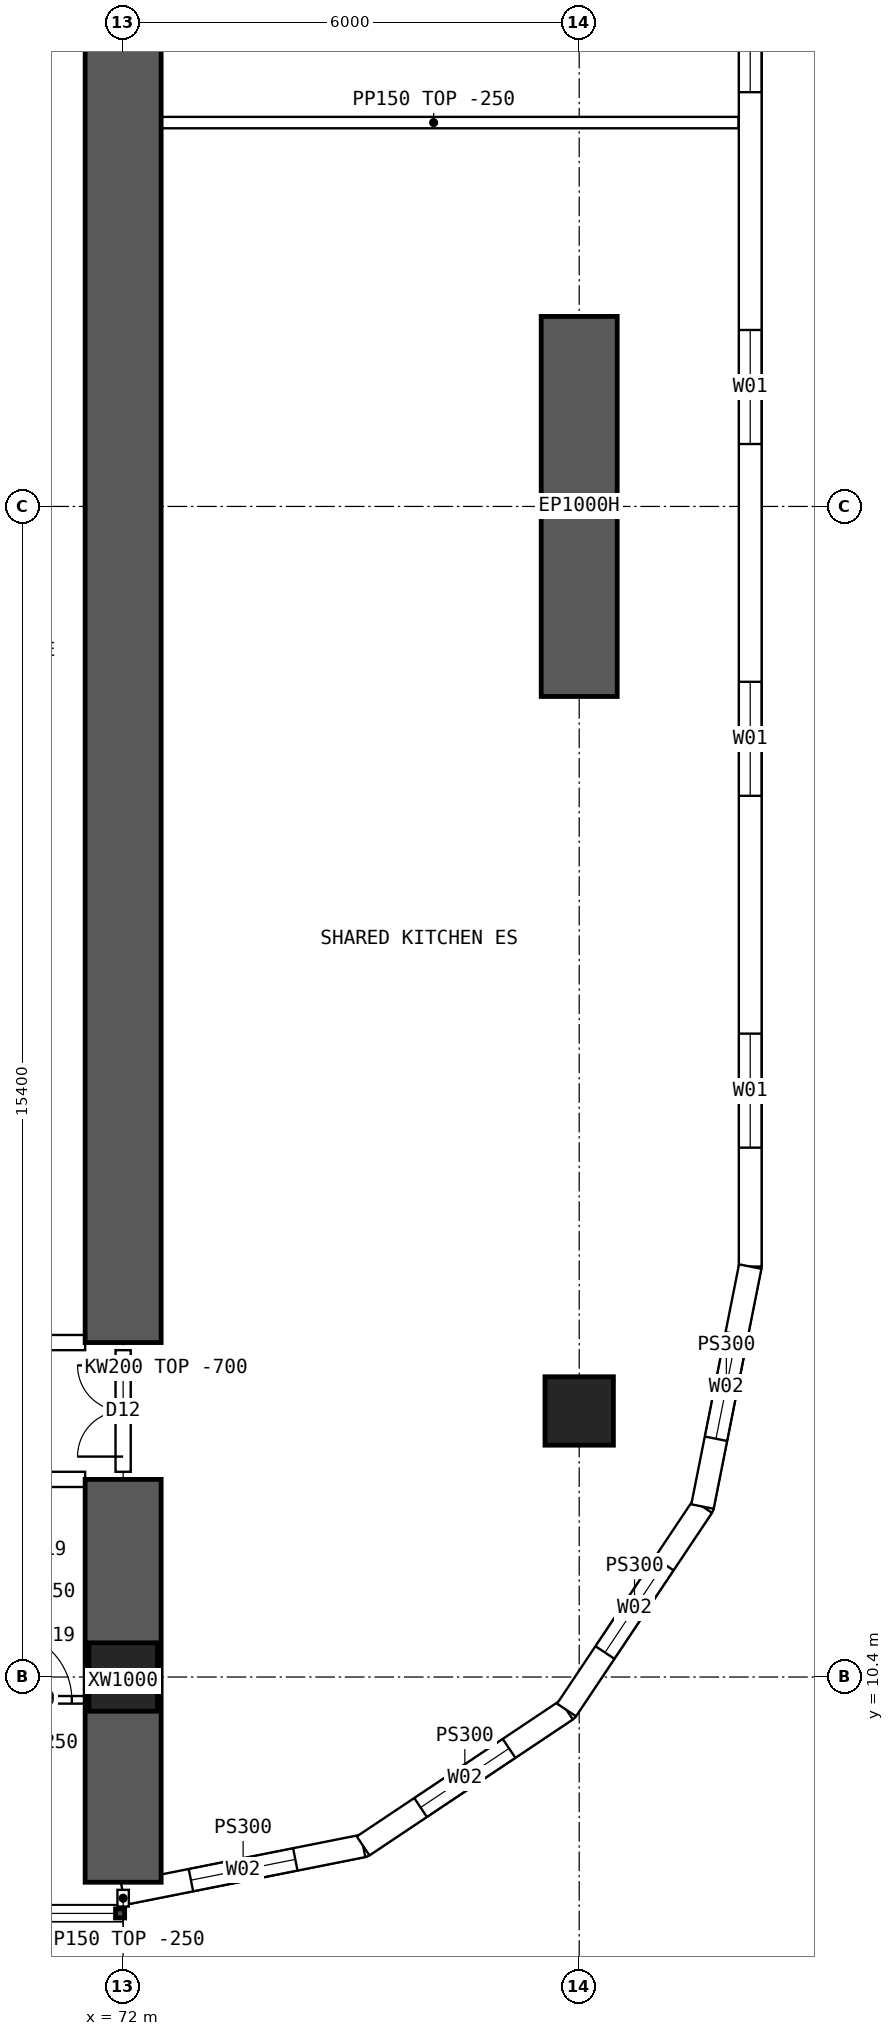
"""IFC4 building model, lengths in metres.
Left out: names, types, materials, properties, quantities, classifications, styles, units other than length and angle.
Written with IfcOpenShell. Run it as: python <this file> out.ifc"""

import sys

from ifc_helpers import new_model, si_unit, direction, frame, frame_2d, origin, origin_2d, place, context, subcontext, project, spatial, polyline, rectangle, hollow_rectangle, outline, extrude, element, fill, save


model = new_model("IFC4")
c1 = context("Model", 3, precision=1e-05, world=origin(), true_north=direction((0.0, 1.0)))
c2 = subcontext(c1, "Body", "Model", "MODEL_VIEW")
j1 = project(units=[si_unit("LENGTHUNIT", "METRE"), si_unit("PLANEANGLEUNIT", "RADIAN")], contexts=[c1])
p1 = place(None, origin())
s1 = spatial("IfcSite", under=j1, at=p1, CompositionType="ELEMENT")
p2 = place(p1, origin())
s2 = spatial("IfcBuilding", under=s1, at=p2, CompositionType="ELEMENT")
p3 = place(p2, frame((0.0, 0.0, 42.7)))
s3 = spatial("IfcBuildingStorey", under=s2, at=p3, CompositionType="ELEMENT", Elevation=42.7)
for number, where, z_axis, x_axis in (
    (1, (72.0, 10.4, 0.0), (0.0, 0.0, 1.0), (1.0, 0.0, 0.0)),
    (2, (78.0, 13.9, 0.0), (0.0, 0.0, 1.0), (1.0, 0.0, 0.0)),
):
    element("IfcColumn", number, at=place(p3, frame(where, z_axis=z_axis, x_axis=x_axis)), inside=s3, PredefinedType="COLUMN", context=c2, shape_type="SweptSolid", body=[
        extrude(hollow_rectangle(XDim=0.9, YDim=0.9, WallThickness=0.09, at=origin_2d()), origin(), (0.0, 0.0, 1.0), 3.75),
    ])
p4 = place(p3, frame((78.0, 23.3, 0.0), z_axis=(0.0, 0.0, 1.0), x_axis=(0.0, 1.0, 0.0)))
e3 = element("IfcWall", 3, at=p4, inside=s3, PredefinedType="SHEAR", context=c2, shape_type="SweptSolid", body=[
    extrude(rectangle(XDim=5.0, YDim=1.0, at=frame_2d((2.5, 0.0))), origin(), (0.0, 0.0, 1.0), 3.75),
])
p5 = place(p3, frame((72.0, 7.7, 0.0), z_axis=(0.0, 0.0, 1.0), x_axis=(0.0, 1.0, 0.0)))
e4 = element("IfcWall", 4, at=p5, inside=s3, PredefinedType="SHEAR", context=c2, shape_type="SweptSolid", body=[
    extrude(rectangle(XDim=5.3, YDim=1.0, at=frame_2d((2.65, 0.0))), origin(), (0.0, 0.0, 1.0), 3.75),
])
p6 = place(p3, frame((72.0, 14.8, 0.0), z_axis=(0.0, 0.0, 1.0), x_axis=(0.0, 1.0, 0.0)))
e5 = element("IfcWall", 5, at=p6, inside=s3, PredefinedType="SHEAR", context=c2, shape_type="SweptSolid", body=[
    extrude(rectangle(XDim=34.4, YDim=1.0, at=frame_2d((17.2, 0.0))), origin(), (0.0, 0.0, 1.0), 3.75),
])
p7 = place(p3, frame((80.25, 15.8, 0.0), z_axis=(0.0, 0.0, 1.0), x_axis=(0.0, 1.0, 0.0)))
e6 = element("IfcWall", 6, at=p7, inside=s3, PredefinedType="SOLIDWALL", context=c2, shape_type="SweptSolid", body=[
    extrude(outline(polyline([(-0.015, -0.15), (32.415, -0.15), (32.385, 0.15), (0.015, 0.15), (-0.015, -0.15)])), origin(), (0.0, 0.0, 1.0), 3.5),
])
p8 = place(p7, frame((1.564, 0.0, 0.9)))
e7 = element("IfcOpeningElement", 7, at=p8, cuts=e6, PredefinedType="OPENING", context=c2, shape_type="SweptSolid", body=[
    extrude(rectangle(XDim=1.5, YDim=2.0, at=frame_2d((0.75, 1.0))), frame((0.0, 0.16, 0.0), z_axis=(0.0, -1.0, 0.0), x_axis=(1.0, 0.0, 0.0)), (0.0, 0.0, 1.0), 0.32),
])
p9 = place(p7, frame((6.193, 0.0, 0.9)))
e8 = element("IfcOpeningElement", 8, at=p9, cuts=e6, PredefinedType="OPENING", context=c2, shape_type="SweptSolid", body=[
    extrude(rectangle(XDim=1.5, YDim=2.0, at=frame_2d((0.75, 1.0))), frame((0.0, 0.16, 0.0), z_axis=(0.0, -1.0, 0.0), x_axis=(1.0, 0.0, 0.0)), (0.0, 0.0, 1.0), 0.32),
])
p10 = place(p7, frame((10.822, 0.0, 0.9)))
e9 = element("IfcOpeningElement", 9, at=p10, cuts=e6, PredefinedType="OPENING", context=c2, shape_type="SweptSolid", body=[
    extrude(rectangle(XDim=1.5, YDim=2.0, at=frame_2d((0.75, 1.0))), frame((0.0, 0.16, 0.0), z_axis=(0.0, -1.0, 0.0), x_axis=(1.0, 0.0, 0.0)), (0.0, 0.0, 1.0), 0.32),
])
p11 = place(p7, frame((15.45, 0.0, 0.9)))
e10 = element("IfcOpeningElement", 10, at=p11, cuts=e6, PredefinedType="OPENING", context=c2, shape_type="SweptSolid", body=[
    extrude(rectangle(XDim=1.5, YDim=2.0, at=frame_2d((0.75, 1.0))), frame((0.0, 0.16, 0.0), z_axis=(0.0, -1.0, 0.0), x_axis=(1.0, 0.0, 0.0)), (0.0, 0.0, 1.0), 0.32),
])
p12 = place(p7, frame((20.079, 0.0, 0.9)))
e11 = element("IfcOpeningElement", 11, at=p12, cuts=e6, PredefinedType="OPENING", context=c2, shape_type="SweptSolid", body=[
    extrude(rectangle(XDim=1.5, YDim=2.0, at=frame_2d((0.75, 1.0))), frame((0.0, 0.16, 0.0), z_axis=(0.0, -1.0, 0.0), x_axis=(1.0, 0.0, 0.0)), (0.0, 0.0, 1.0), 0.32),
])
p13 = place(p7, frame((24.707, 0.0, 0.9)))
e12 = element("IfcOpeningElement", 12, at=p13, cuts=e6, PredefinedType="OPENING", context=c2, shape_type="SweptSolid", body=[
    extrude(rectangle(XDim=1.5, YDim=2.0, at=frame_2d((0.75, 1.0))), frame((0.0, 0.16, 0.0), z_axis=(0.0, -1.0, 0.0), x_axis=(1.0, 0.0, 0.0)), (0.0, 0.0, 1.0), 0.32),
])
p14 = place(p7, frame((29.336, 0.0, 0.9)))
e13 = element("IfcOpeningElement", 13, at=p14, cuts=e6, PredefinedType="OPENING", context=c2, shape_type="SweptSolid", body=[
    extrude(rectangle(XDim=1.5, YDim=2.0, at=frame_2d((0.75, 1.0))), frame((0.0, 0.16, 0.0), z_axis=(0.0, -1.0, 0.0), x_axis=(1.0, 0.0, 0.0)), (0.0, 0.0, 1.0), 0.32),
])
p15 = place(p3, frame((72.0, 7.55, 0.0), z_axis=(0.0, 0.0, 1.0), x_axis=(0.980787251524, 0.195080412259, 0.0)))
e14 = element("IfcWall", 14, at=p15, inside=s3, PredefinedType="SOLIDWALL", context=c2, shape_type="SweptSolid", body=[
    extrude(outline(polyline([(-0.03, -0.15), (3.249, -0.15), (3.189, 0.15), (0.03, 0.15), (-0.03, -0.15)])), origin(), (0.0, 0.0, 1.0), 3.5),
])
p16 = place(p15, frame((0.909, 0.0, 0.9)))
e15 = element("IfcOpeningElement", 15, at=p16, cuts=e14, PredefinedType="OPENING", context=c2, shape_type="SweptSolid", body=[
    extrude(rectangle(XDim=1.4, YDim=1.8, at=frame_2d((0.7, 0.9))), frame((0.0, 0.16, 0.0), z_axis=(0.0, -1.0, 0.0), x_axis=(1.0, 0.0, 0.0)), (0.0, 0.0, 1.0), 0.32),
])
p17 = place(p3, frame((75.157, 8.178, 0.0), z_axis=(0.0, 0.0, 1.0), x_axis=(0.831478105043, 0.555557522525, 0.0)))
e16 = element("IfcWall", 16, at=p17, inside=s3, PredefinedType="SOLIDWALL", context=c2, shape_type="SweptSolid", body=[
    extrude(outline(polyline([(-0.03, -0.15), (3.249, -0.15), (3.189, 0.15), (0.03, 0.15), (-0.03, -0.15)])), origin(), (0.0, 0.0, 1.0), 3.5),
])
p18 = place(p17, frame((0.909, 0.0, 0.9)))
e17 = element("IfcOpeningElement", 17, at=p18, cuts=e16, PredefinedType="OPENING", context=c2, shape_type="SweptSolid", body=[
    extrude(rectangle(XDim=1.4, YDim=1.8, at=frame_2d((0.7, 0.9))), frame((0.0, 0.16, 0.0), z_axis=(0.0, -1.0, 0.0), x_axis=(1.0, 0.0, 0.0)), (0.0, 0.0, 1.0), 0.32),
])
p19 = place(p3, frame((77.833, 9.966, 0.0), z_axis=(0.0, 0.0, 1.0), x_axis=(0.555609954424, 0.831443069936, 0.0)))
e18 = element("IfcWall", 18, at=p19, inside=s3, PredefinedType="SOLIDWALL", context=c2, shape_type="SweptSolid", body=[
    extrude(outline(polyline([(-0.03, -0.15), (3.249, -0.15), (3.189, 0.15), (0.03, 0.15), (-0.03, -0.15)])), origin(), (0.0, 0.0, 1.0), 3.5),
])
p20 = place(p19, frame((0.909, 0.0, 0.9)))
e19 = element("IfcOpeningElement", 19, at=p20, cuts=e18, PredefinedType="OPENING", context=c2, shape_type="SweptSolid", body=[
    extrude(rectangle(XDim=1.4, YDim=1.8, at=frame_2d((0.7, 0.9))), frame((0.0, 0.16, 0.0), z_axis=(0.0, -1.0, 0.0), x_axis=(1.0, 0.0, 0.0)), (0.0, 0.0, 1.0), 0.32),
])
p21 = place(p3, frame((79.622, 12.643, 0.0), z_axis=(0.0, 0.0, 1.0), x_axis=(0.195065901187, 0.980790137692, 0.0)))
e20 = element("IfcWall", 20, at=p21, inside=s3, PredefinedType="SOLIDWALL", context=c2, shape_type="SweptSolid", body=[
    extrude(outline(polyline([(-0.03, -0.15), (3.234, -0.15), (3.204, 0.15), (0.03, 0.15), (-0.03, -0.15)])), origin(), (0.0, 0.0, 1.0), 3.5),
])
p22 = place(p21, frame((0.909, 0.0, 0.9)))
e21 = element("IfcOpeningElement", 21, at=p22, cuts=e20, PredefinedType="OPENING", context=c2, shape_type="SweptSolid", body=[
    extrude(rectangle(XDim=1.4, YDim=1.8, at=frame_2d((0.7, 0.9))), frame((0.0, 0.16, 0.0), z_axis=(0.0, -1.0, 0.0), x_axis=(1.0, 0.0, 0.0)), (0.0, 0.0, 1.0), 0.32),
])
p23 = place(p3, frame((66.5, 13.0, 0.0), z_axis=(0.0, 0.0, 1.0), x_axis=(1.0, 0.0, 0.0)))
e22 = element("IfcWall", 22, at=p23, inside=s3, PredefinedType="SOLIDWALL", context=c2, shape_type="SweptSolid", body=[
    extrude(outline(polyline([(0.0, 0.0), (5.0, 0.0), (5.0, 3.1), (0.0, 3.1), (0.0, 0.0)])), frame((0.0, 0.1, 0.0), z_axis=(0.0, -1.0, 0.0), x_axis=(1.0, 0.0, 0.0)), (0.0, 0.0, 1.0), 0.2),
])
p24 = place(p23, frame((1.3, 0.0, 0.0)))
e23 = element("IfcOpeningElement", 23, at=p24, cuts=e22, PredefinedType="OPENING", context=c2, shape_type="SweptSolid", body=[
    extrude(rectangle(XDim=0.9, YDim=2.1, at=frame_2d((0.45, 1.05))), frame((0.0, 0.11, 0.0), z_axis=(0.0, -1.0, 0.0), x_axis=(1.0, 0.0, 0.0)), (0.0, 0.0, 1.0), 0.22),
])
p25 = place(p23, frame((2.675, 0.0, 0.0)))
e24 = element("IfcOpeningElement", 24, at=p25, cuts=e22, PredefinedType="OPENING", context=c2, shape_type="SweptSolid", body=[
    extrude(rectangle(XDim=0.9, YDim=2.1, at=frame_2d((0.45, 1.05))), frame((0.0, 0.11, 0.0), z_axis=(0.0, -1.0, 0.0), x_axis=(1.0, 0.0, 0.0)), (0.0, 0.0, 1.0), 0.22),
])
p26 = place(p3, frame((66.5, 14.8, 0.0), z_axis=(0.0, 0.0, 1.0), x_axis=(1.0, 0.0, 0.0)))
e25 = element("IfcWall", 25, at=p26, inside=s3, PredefinedType="SOLIDWALL", context=c2, shape_type="SweptSolid", body=[
    extrude(rectangle(XDim=5.0, YDim=0.2, at=frame_2d((2.5, 0.0))), origin(), (0.0, 0.0, 1.0), 3.5),
])
p27 = place(p26, frame((0.2, 0.0, 0.0)))
e26 = element("IfcOpeningElement", 26, at=p27, cuts=e25, PredefinedType="OPENING", context=c2, shape_type="SweptSolid", body=[
    extrude(rectangle(XDim=1.6, YDim=2.1, at=frame_2d((0.8, 1.05))), frame((0.0, 0.11, 0.0), z_axis=(0.0, -1.0, 0.0), x_axis=(1.0, 0.0, 0.0)), (0.0, 0.0, 1.0), 0.22),
])
p28 = place(p3, frame((71.55, 10.1, 0.0), z_axis=(0.0, 0.0, 1.0), x_axis=(-1.0, 0.0, 0.0)))
e27 = element("IfcWall", 27, at=p28, inside=s3, PredefinedType="PARTITIONING", context=c2, shape_type="SweptSolid", body=[
    extrude(rectangle(XDim=1.3, YDim=0.1, at=frame_2d((0.65, 0.0))), origin(), (0.0, 0.0, 1.0), 3.5),
])
p29 = place(p28, frame((0.225, 0.0, 0.0)))
e28 = element("IfcOpeningElement", 28, at=p29, cuts=e27, PredefinedType="OPENING", context=c2, shape_type="SweptSolid", body=[
    extrude(rectangle(XDim=0.9, YDim=2.1, at=frame_2d((0.45, 1.05))), frame((0.0, 0.06, 0.0), z_axis=(0.0, -1.0, 0.0), x_axis=(1.0, 0.0, 0.0)), (0.0, 0.0, 1.0), 0.12),
])
p30 = place(p3, frame((72.075, 30.85, 0.0), z_axis=(0.0, 0.0, 1.0), x_axis=(1.0, 0.0, 0.0)))
e29 = element("IfcWall", 29, at=p30, inside=s3, PredefinedType="PARTITIONING", context=c2, shape_type="SweptSolid", body=[
    extrude(outline(polyline([(0.0, 0.0), (8.02, 0.0), (8.02, 3.5), (6.227, 3.5), (6.225, 3.05), (5.627, 3.05), (5.625, 3.5), (0.0, 3.5), (0.0, 0.0)])), frame((0.0, 0.075, 0.0), z_axis=(0.0, -1.0, 0.0), x_axis=(1.0, 0.0, 0.0)), (0.0, 0.0, 1.0), 0.15),
])
p31 = place(p3, frame((72.0, 13.1, 0.0), z_axis=(0.0, 0.0, 1.0), x_axis=(0.0, 1.0, 0.0)))
e30 = element("IfcWall", 30, at=p31, inside=s3, PredefinedType="SOLIDWALL", context=c2, shape_type="SweptSolid", body=[
    extrude(outline(polyline([(0.0, 0.0), (1.6, 0.0), (1.6, 3.05), (0.0, 3.05), (0.0, 0.0)])), frame((0.0, 0.1, 0.0), z_axis=(0.0, -1.0, 0.0), x_axis=(1.0, 0.0, 0.0)), (0.0, 0.0, 1.0), 0.2),
])
p32 = place(p31, frame((0.2, 0.0, 0.0)))
e31 = element("IfcOpeningElement", 31, at=p32, cuts=e30, PredefinedType="OPENING", context=c2, shape_type="SweptSolid", body=[
    extrude(rectangle(XDim=1.2, YDim=2.1, at=frame_2d((0.6, 1.05))), frame((0.0, 0.11, 0.0), z_axis=(0.0, -1.0, 0.0), x_axis=(1.0, 0.0, 0.0)), (0.0, 0.0, 1.0), 0.22),
])
p33 = place(p3, frame((72.0, 7.6, 0.0), z_axis=(0.0, 0.0, 1.0), x_axis=(0.0, -1.0, 0.0)))
e32 = element("IfcWall", 32, at=p33, inside=s3, PredefinedType="PARTITIONING", context=c2, shape_type="SweptSolid", body=[
    extrude(rectangle(XDim=0.22, YDim=0.15, at=frame_2d((0.11, 0.0))), origin(), (0.0, 0.0, 1.0), 3.5),
])
p34 = place(p8, origin())
e33 = element("IfcWindow", 33, at=p34, inside=s3, PartitioningType="SINGLE_PANEL", PredefinedType="WINDOW", context=c2, shape_type="SweptSolid", body=[
    extrude(rectangle(XDim=1.5, YDim=2.0, at=frame_2d((0.75, 1.0))), frame((0.0, 0.03, 0.0), z_axis=(0.0, -1.0, 0.0), x_axis=(1.0, 0.0, 0.0)), (0.0, 0.0, 1.0), 0.06),
])
fill(e7, e33)
p35 = place(p9, origin())
e34 = element("IfcWindow", 34, at=p35, inside=s3, PartitioningType="SINGLE_PANEL", PredefinedType="WINDOW", context=c2, shape_type="SweptSolid", body=[
    extrude(rectangle(XDim=1.5, YDim=2.0, at=frame_2d((0.75, 1.0))), frame((0.0, 0.03, 0.0), z_axis=(0.0, -1.0, 0.0), x_axis=(1.0, 0.0, 0.0)), (0.0, 0.0, 1.0), 0.06),
])
fill(e8, e34)
p36 = place(p10, origin())
e35 = element("IfcWindow", 35, at=p36, inside=s3, PartitioningType="SINGLE_PANEL", PredefinedType="WINDOW", context=c2, shape_type="SweptSolid", body=[
    extrude(rectangle(XDim=1.5, YDim=2.0, at=frame_2d((0.75, 1.0))), frame((0.0, 0.03, 0.0), z_axis=(0.0, -1.0, 0.0), x_axis=(1.0, 0.0, 0.0)), (0.0, 0.0, 1.0), 0.06),
])
fill(e9, e35)
p37 = place(p11, origin())
e36 = element("IfcWindow", 36, at=p37, inside=s3, PartitioningType="SINGLE_PANEL", PredefinedType="WINDOW", context=c2, shape_type="SweptSolid", body=[
    extrude(rectangle(XDim=1.5, YDim=2.0, at=frame_2d((0.75, 1.0))), frame((0.0, 0.03, 0.0), z_axis=(0.0, -1.0, 0.0), x_axis=(1.0, 0.0, 0.0)), (0.0, 0.0, 1.0), 0.06),
])
fill(e10, e36)
p38 = place(p16, origin())
e37 = element("IfcWindow", 37, at=p38, inside=s3, PartitioningType="SINGLE_PANEL", PredefinedType="WINDOW", context=c2, shape_type="SweptSolid", body=[
    extrude(rectangle(XDim=1.4, YDim=1.8, at=frame_2d((0.7, 0.9))), frame((0.0, 0.03, 0.0), z_axis=(0.0, -1.0, 0.0), x_axis=(1.0, 0.0, 0.0)), (0.0, 0.0, 1.0), 0.06),
])
fill(e15, e37)
p39 = place(p18, origin())
e38 = element("IfcWindow", 38, at=p39, inside=s3, PartitioningType="SINGLE_PANEL", PredefinedType="WINDOW", context=c2, shape_type="SweptSolid", body=[
    extrude(rectangle(XDim=1.4, YDim=1.8, at=frame_2d((0.7, 0.9))), frame((0.0, 0.03, 0.0), z_axis=(0.0, -1.0, 0.0), x_axis=(1.0, 0.0, 0.0)), (0.0, 0.0, 1.0), 0.06),
])
fill(e17, e38)
p40 = place(p20, origin())
e39 = element("IfcWindow", 39, at=p40, inside=s3, PartitioningType="SINGLE_PANEL", PredefinedType="WINDOW", context=c2, shape_type="SweptSolid", body=[
    extrude(rectangle(XDim=1.4, YDim=1.8, at=frame_2d((0.7, 0.9))), frame((0.0, 0.03, 0.0), z_axis=(0.0, -1.0, 0.0), x_axis=(1.0, 0.0, 0.0)), (0.0, 0.0, 1.0), 0.06),
])
fill(e19, e39)
p41 = place(p22, origin())
e40 = element("IfcWindow", 40, at=p41, inside=s3, PartitioningType="SINGLE_PANEL", PredefinedType="WINDOW", context=c2, shape_type="SweptSolid", body=[
    extrude(rectangle(XDim=1.4, YDim=1.8, at=frame_2d((0.7, 0.9))), frame((0.0, 0.03, 0.0), z_axis=(0.0, -1.0, 0.0), x_axis=(1.0, 0.0, 0.0)), (0.0, 0.0, 1.0), 0.06),
])
fill(e21, e40)
p42 = place(p29, origin())
e41 = element("IfcDoor", 41, at=p42, inside=s3, OperationType="SINGLE_SWING_RIGHT", PredefinedType="DOOR", context=c2, shape_type="SweptSolid", body=[
    extrude(rectangle(XDim=0.9, YDim=2.1, at=frame_2d((0.45, 1.05))), frame((0.0, 0.025, 0.0), z_axis=(0.0, -1.0, 0.0), x_axis=(1.0, 0.0, 0.0)), (0.0, 0.0, 1.0), 0.05),
])
fill(e28, e41)
p43 = place(p32, origin())
e42 = element("IfcDoor", 42, at=p43, inside=s3, OperationType="DOUBLE_DOOR_SINGLE_SWING", PredefinedType="DOOR", context=c2, shape_type="SweptSolid", body=[
    extrude(rectangle(XDim=1.2, YDim=2.1, at=frame_2d((0.6, 1.05))), frame((0.0, 0.025, 0.0), z_axis=(0.0, -1.0, 0.0), x_axis=(1.0, 0.0, 0.0)), (0.0, 0.0, 1.0), 0.05),
])
fill(e31, e42)
save(model, sys.argv[1])
